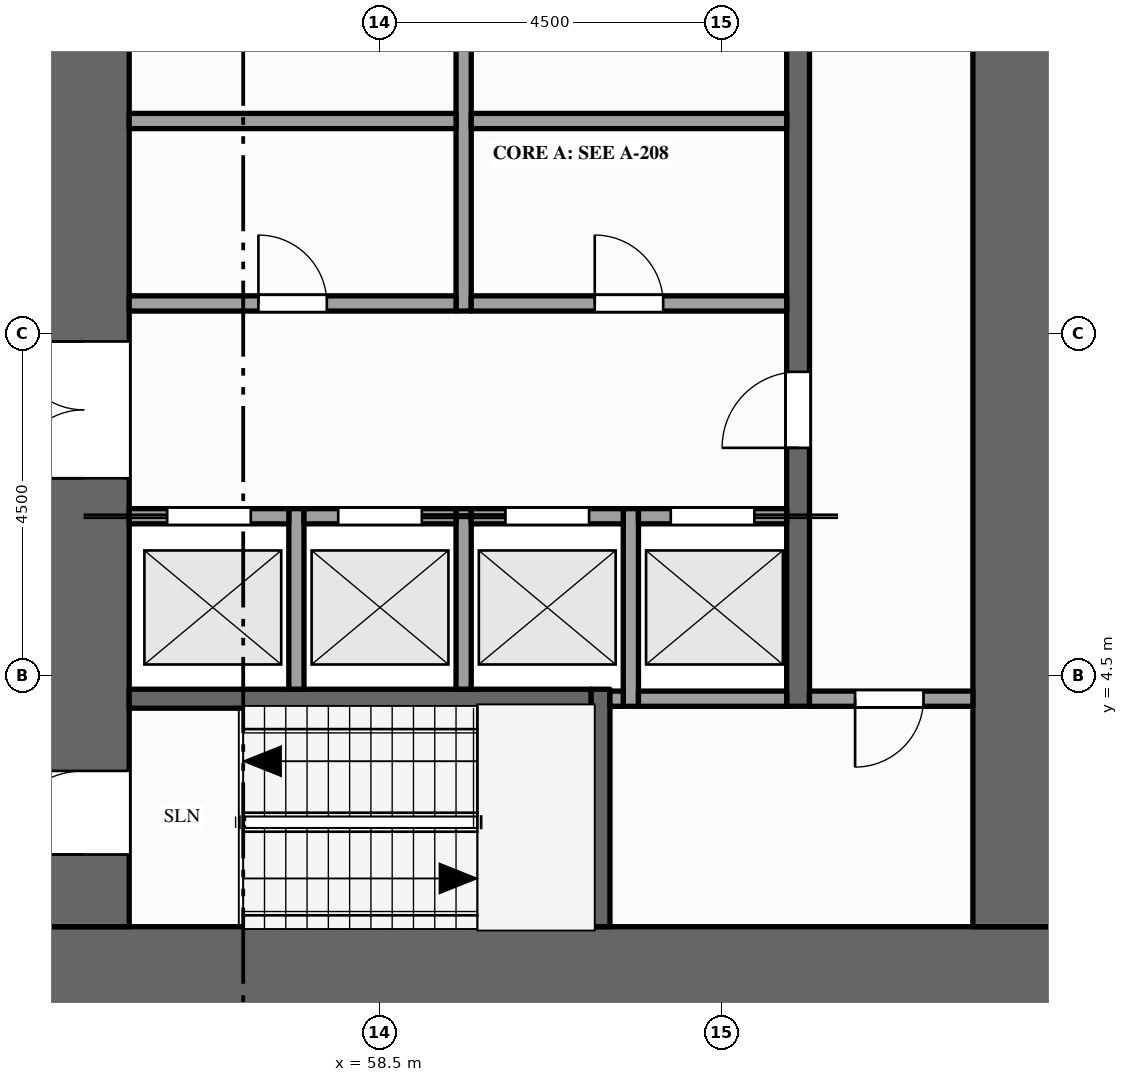
"""IFC4 building model, lengths in metres.
Left out: names, types, materials, properties, quantities, classifications, styles, units other than length and angle.
Written with IfcOpenShell. Run it as: python <this file> out.ifc"""

import sys

from ifc_helpers import new_model, si_unit, direction, frame, frame_2d, origin, place, context, subcontext, project, spatial, rectangle, extrude, element, fill, save


model = new_model("IFC4")
c1 = context("Model", 3, precision=1e-05, world=origin(), true_north=direction((0.0, 1.0)))
c2 = subcontext(c1, "Body", "Model", "MODEL_VIEW")
j1 = project(units=[si_unit("LENGTHUNIT", "METRE"), si_unit("PLANEANGLEUNIT", "RADIAN")], contexts=[c1])
p1 = place(None, origin())
s1 = spatial("IfcSite", under=j1, at=p1, CompositionType="ELEMENT")
p2 = place(p1, origin())
s2 = spatial("IfcBuilding", under=s1, at=p2, CompositionType="ELEMENT")
p3 = place(p2, frame((0.0, 0.0, 41.0)))
s3 = spatial("IfcBuildingStorey", under=s2, at=p3, CompositionType="ELEMENT", Elevation=41.0)
p4 = place(p3, frame((67.5, 0.6, -0.15), z_axis=(0.0, 0.0, 1.0), x_axis=(-1.0, 0.0, 0.0)))
e1 = element("IfcWall", 1, at=p4, inside=s3, PredefinedType="SHEAR", context=c2, shape_type="SweptSolid", body=[
    extrude(rectangle(XDim=13.5, YDim=1.2, at=frame_2d((6.75, 0.0))), origin(), (0.0, 0.0, 1.0), 4.0),
])
p5 = place(p3, frame((54.6, 1.2, -0.15), z_axis=(0.0, 0.0, 1.0), x_axis=(0.0, 1.0, 0.0)))
e2 = element("IfcWall", 2, at=p5, inside=s3, PredefinedType="SHEAR", context=c2, shape_type="SweptSolid", body=[
    extrude(rectangle(XDim=20.1, YDim=1.2, at=frame_2d((10.05, 0.0))), origin(), (0.0, 0.0, 1.0), 4.0),
])
p6 = place(p5, frame((5.9, 0.0, 0.15)))
e3 = element("IfcOpeningElement", 3, at=p6, cuts=e2, PredefinedType="OPENING", context=c2, shape_type="SweptSolid", body=[
    extrude(rectangle(XDim=1.8, YDim=2.1, at=frame_2d((0.9, 1.05))), frame((0.0, 0.61, 0.0), z_axis=(0.0, -1.0, 0.0), x_axis=(1.0, 0.0, 0.0)), (0.0, 0.0, 1.0), 1.22),
])
p7 = place(p5, frame((11.95, 0.0, 0.15)))
e4 = element("IfcOpeningElement", 4, at=p7, cuts=e2, PredefinedType="OPENING", context=c2, shape_type="SweptSolid", body=[
    extrude(rectangle(XDim=1.1, YDim=2.1, at=frame_2d((0.55, 1.05))), frame((0.0, 0.61, 0.0), z_axis=(0.0, -1.0, 0.0), x_axis=(1.0, 0.0, 0.0)), (0.0, 0.0, 1.0), 1.22),
])
p8 = place(p5, frame((0.95, 0.0, 0.15)))
e5 = element("IfcOpeningElement", 5, at=p8, cuts=e2, PredefinedType="OPENING", context=c2, shape_type="SweptSolid", body=[
    extrude(rectangle(XDim=1.1, YDim=2.1, at=frame_2d((0.55, 1.05))), frame((0.0, 0.61, 0.0), z_axis=(0.0, -1.0, 0.0), x_axis=(1.0, 0.0, 0.0)), (0.0, 0.0, 1.0), 1.22),
])
p9 = place(p5, frame((18.15, 0.0, 0.15)))
e6 = element("IfcOpeningElement", 6, at=p9, cuts=e2, PredefinedType="OPENING", context=c2, shape_type="SweptSolid", body=[
    extrude(rectangle(XDim=1.1, YDim=2.1, at=frame_2d((0.55, 1.05))), frame((0.0, 0.61, 0.0), z_axis=(0.0, -1.0, 0.0), x_axis=(1.0, 0.0, 0.0)), (0.0, 0.0, 1.0), 1.22),
])
p10 = place(p3, frame((66.9, 1.2, -0.15), z_axis=(0.0, 0.0, 1.0), x_axis=(0.0, 1.0, 0.0)))
e7 = element("IfcWall", 7, at=p10, inside=s3, PredefinedType="SHEAR", context=c2, shape_type="SweptSolid", body=[
    extrude(rectangle(XDim=20.1, YDim=1.2, at=frame_2d((10.05, 0.0))), origin(), (0.0, 0.0, 1.0), 4.0),
])
for number, where, z_axis, x_axis in (
    (8, (57.4, 4.325, 0.0), (0.0, 0.0, 1.0), (0.0, 1.0, 0.0)),
    (9, (59.6, 4.325, 0.0), (0.0, 0.0, 1.0), (0.0, 1.0, 0.0)),
):
    element("IfcWall", number, at=place(p3, frame(where, z_axis=z_axis, x_axis=x_axis)), inside=s3, PredefinedType="SOLIDWALL", context=c2, shape_type="SweptSolid", body=[
        extrude(rectangle(XDim=2.375, YDim=0.2, at=frame_2d((1.188, 0.0))), origin(), (0.0, 0.0, 1.0), 3.85),
    ])
p11 = place(p3, frame((59.6, 9.3, 0.0), z_axis=(0.0, 0.0, 1.0), x_axis=(0.0, 1.0, 0.0)))
e10 = element("IfcWall", 10, at=p11, inside=s3, PredefinedType="PARTITIONING", context=c2, shape_type="SweptSolid", body=[
    extrude(rectangle(XDim=6.2, YDim=0.2, at=frame_2d((3.1, 0.0))), origin(), (0.0, 0.0, 1.0), 3.85),
])
p12 = place(p11, frame((3.9, 0.0, 0.0)))
e11 = element("IfcOpeningElement", 11, at=p12, cuts=e10, PredefinedType="OPENING", context=c2, shape_type="SweptSolid", body=[
    extrude(rectangle(XDim=1.0, YDim=2.1, at=frame_2d((0.5, 1.05))), frame((0.0, 0.11, 0.0), z_axis=(0.0, -1.0, 0.0), x_axis=(1.0, 0.0, 0.0)), (0.0, 0.0, 1.0), 0.22),
])
p13 = place(p3, frame((61.4, 1.2, 0.0), z_axis=(0.0, 0.0, 1.0), x_axis=(0.0, 1.0, 0.0)))
e12 = element("IfcWall", 12, at=p13, inside=s3, PredefinedType="SHEAR", context=c2, shape_type="SweptSolid", body=[
    extrude(rectangle(XDim=3.125, YDim=0.25, at=frame_2d((1.562, 0.0))), origin(), (0.0, 0.0, 1.0), 3.85),
])
p14 = place(p3, frame((61.8, 4.1, 0.0), z_axis=(0.0, 0.0, 1.0), x_axis=(0.0, 1.0, 0.0)))
e13 = element("IfcWall", 13, at=p14, inside=s3, PredefinedType="SOLIDWALL", context=c2, shape_type="SweptSolid", body=[
    extrude(rectangle(XDim=2.6, YDim=0.2, at=frame_2d((1.3, 0.0))), origin(), (0.0, 0.0, 1.0), 3.85),
])
p15 = place(p3, frame((64.0, 4.1, 0.0), z_axis=(0.0, 0.0, 1.0), x_axis=(0.0, 1.0, 0.0)))
e14 = element("IfcWall", 14, at=p15, inside=s3, PredefinedType="SHEAR", context=c2, shape_type="SweptSolid", body=[
    extrude(rectangle(XDim=14.5, YDim=0.3, at=frame_2d((7.25, 0.0))), origin(), (0.0, 0.0, 1.0), 3.85),
])
p16 = place(p15, frame((3.4, 0.0, 0.0)))
e15 = element("IfcOpeningElement", 15, at=p16, cuts=e14, PredefinedType="OPENING", context=c2, shape_type="SweptSolid", body=[
    extrude(rectangle(XDim=1.0, YDim=2.1, at=frame_2d((0.5, 1.05))), frame((0.0, 0.16, 0.0), z_axis=(0.0, -1.0, 0.0), x_axis=(1.0, 0.0, 0.0)), (0.0, 0.0, 1.0), 0.32),
])
p17 = place(p15, frame((9.1, 0.0, 0.0)))
e16 = element("IfcOpeningElement", 16, at=p17, cuts=e14, PredefinedType="OPENING", context=c2, shape_type="SweptSolid", body=[
    extrude(rectangle(XDim=1.0, YDim=2.1, at=frame_2d((0.5, 1.05))), frame((0.0, 0.16, 0.0), z_axis=(0.0, -1.0, 0.0), x_axis=(1.0, 0.0, 0.0)), (0.0, 0.0, 1.0), 0.32),
])
p18 = place(p3, frame((55.2, 4.2, 0.0), z_axis=(0.0, 0.0, 1.0), x_axis=(1.0, 0.0, 0.0)))
e17 = element("IfcWall", 17, at=p18, inside=s3, PredefinedType="SHEAR", context=c2, shape_type="SweptSolid", body=[
    extrude(rectangle(XDim=6.075, YDim=0.25, at=frame_2d((3.038, 0.0))), origin(), (0.0, 0.0, 1.0), 3.85),
])
p19 = place(p3, frame((61.525, 4.2, 0.0), z_axis=(0.0, 0.0, 1.0), x_axis=(1.0, 0.0, 0.0)))
e18 = element("IfcWall", 18, at=p19, inside=s3, PredefinedType="SOLIDWALL", context=c2, shape_type="SweptSolid", body=[
    extrude(rectangle(XDim=0.175, YDim=0.2, at=frame_2d((0.087, 0.0))), origin(), (0.0, 0.0, 1.0), 3.85),
])
p20 = place(p3, frame((61.9, 4.2, 0.0), z_axis=(0.0, 0.0, 1.0), x_axis=(1.0, 0.0, 0.0)))
e19 = element("IfcWall", 19, at=p20, inside=s3, PredefinedType="SOLIDWALL", context=c2, shape_type="SweptSolid", body=[
    extrude(rectangle(XDim=1.95, YDim=0.2, at=frame_2d((0.975, 0.0))), origin(), (0.0, 0.0, 1.0), 3.85),
])
p21 = place(p3, frame((64.15, 4.2, 0.0), z_axis=(0.0, 0.0, 1.0), x_axis=(1.0, 0.0, 0.0)))
e20 = element("IfcWall", 20, at=p21, inside=s3, PredefinedType="PARTITIONING", context=c2, shape_type="SweptSolid", body=[
    extrude(rectangle(XDim=2.15, YDim=0.2, at=frame_2d((1.075, 0.0))), origin(), (0.0, 0.0, 1.0), 3.85),
])
p22 = place(p21, frame((0.6, 0.0, 0.0)))
e21 = element("IfcOpeningElement", 21, at=p22, cuts=e20, PredefinedType="OPENING", context=c2, shape_type="SweptSolid", body=[
    extrude(rectangle(XDim=0.9, YDim=2.1, at=frame_2d((0.45, 1.05))), frame((0.0, 0.11, 0.0), z_axis=(0.0, -1.0, 0.0), x_axis=(1.0, 0.0, 0.0)), (0.0, 0.0, 1.0), 0.22),
])
p23 = place(p3, frame((55.2, 6.6, 0.0), z_axis=(0.0, 0.0, 1.0), x_axis=(1.0, 0.0, 0.0)))
e22 = element("IfcWall", 22, at=p23, inside=s3, PredefinedType="SOLIDWALL", context=c2, shape_type="SweptSolid", body=[
    extrude(rectangle(XDim=2.1, YDim=0.2, at=frame_2d((1.05, 0.0))), origin(), (0.0, 0.0, 1.0), 3.85),
])
p24 = place(p23, frame((0.5, 0.0, 0.012)))
e23 = element("IfcOpeningElement", 23, at=p24, cuts=e22, PredefinedType="OPENING", context=c2, shape_type="SweptSolid", body=[
    extrude(rectangle(XDim=1.1, YDim=2.1, at=frame_2d((0.55, 1.05))), frame((0.0, 0.11, 0.0), z_axis=(0.0, -1.0, 0.0), x_axis=(1.0, 0.0, 0.0)), (0.0, 0.0, 1.0), 0.22),
])
p25 = place(p3, frame((57.5, 6.6, 0.0), z_axis=(0.0, 0.0, 1.0), x_axis=(1.0, 0.0, 0.0)))
e24 = element("IfcWall", 24, at=p25, inside=s3, PredefinedType="SOLIDWALL", context=c2, shape_type="SweptSolid", body=[
    extrude(rectangle(XDim=2.0, YDim=0.2, at=frame_2d((1.0, 0.0))), origin(), (0.0, 0.0, 1.0), 3.85),
])
p26 = place(p25, frame((0.45, 0.0, 0.012)))
e25 = element("IfcOpeningElement", 25, at=p26, cuts=e24, PredefinedType="OPENING", context=c2, shape_type="SweptSolid", body=[
    extrude(rectangle(XDim=1.1, YDim=2.1, at=frame_2d((0.55, 1.05))), frame((0.0, 0.11, 0.0), z_axis=(0.0, -1.0, 0.0), x_axis=(1.0, 0.0, 0.0)), (0.0, 0.0, 1.0), 0.22),
])
p27 = place(p3, frame((59.7, 6.6, 0.0), z_axis=(0.0, 0.0, 1.0), x_axis=(1.0, 0.0, 0.0)))
e26 = element("IfcWall", 26, at=p27, inside=s3, PredefinedType="SOLIDWALL", context=c2, shape_type="SweptSolid", body=[
    extrude(rectangle(XDim=2.0, YDim=0.2, at=frame_2d((1.0, 0.0))), origin(), (0.0, 0.0, 1.0), 3.85),
])
p28 = place(p27, frame((0.45, 0.0, 0.012)))
e27 = element("IfcOpeningElement", 27, at=p28, cuts=e26, PredefinedType="OPENING", context=c2, shape_type="SweptSolid", body=[
    extrude(rectangle(XDim=1.1, YDim=2.1, at=frame_2d((0.55, 1.05))), frame((0.0, 0.11, 0.0), z_axis=(0.0, -1.0, 0.0), x_axis=(1.0, 0.0, 0.0)), (0.0, 0.0, 1.0), 0.22),
])
p29 = place(p3, frame((61.9, 6.6, 0.0), z_axis=(0.0, 0.0, 1.0), x_axis=(1.0, 0.0, 0.0)))
e28 = element("IfcWall", 28, at=p29, inside=s3, PredefinedType="SOLIDWALL", context=c2, shape_type="SweptSolid", body=[
    extrude(rectangle(XDim=1.95, YDim=0.2, at=frame_2d((0.975, 0.0))), origin(), (0.0, 0.0, 1.0), 3.85),
])
p30 = place(p29, frame((0.425, 0.0, 0.012)))
e29 = element("IfcOpeningElement", 29, at=p30, cuts=e28, PredefinedType="OPENING", context=c2, shape_type="SweptSolid", body=[
    extrude(rectangle(XDim=1.1, YDim=2.1, at=frame_2d((0.55, 1.05))), frame((0.0, 0.11, 0.0), z_axis=(0.0, -1.0, 0.0), x_axis=(1.0, 0.0, 0.0)), (0.0, 0.0, 1.0), 0.22),
])
p31 = place(p3, frame((55.2, 9.4, 0.0), z_axis=(0.0, 0.0, 1.0), x_axis=(1.0, 0.0, 0.0)))
e30 = element("IfcWall", 30, at=p31, inside=s3, PredefinedType="PARTITIONING", context=c2, shape_type="SweptSolid", body=[
    extrude(rectangle(XDim=4.3, YDim=0.2, at=frame_2d((2.15, 0.0))), origin(), (0.0, 0.0, 1.0), 3.85),
])
p32 = place(p31, frame((1.7, 0.0, 0.0)))
e31 = element("IfcOpeningElement", 31, at=p32, cuts=e30, PredefinedType="OPENING", context=c2, shape_type="SweptSolid", body=[
    extrude(rectangle(XDim=0.9, YDim=2.1, at=frame_2d((0.45, 1.05))), frame((0.0, 0.11, 0.0), z_axis=(0.0, -1.0, 0.0), x_axis=(1.0, 0.0, 0.0)), (0.0, 0.0, 1.0), 0.22),
])
p33 = place(p3, frame((59.7, 9.4, 0.0), z_axis=(0.0, 0.0, 1.0), x_axis=(1.0, 0.0, 0.0)))
e32 = element("IfcWall", 32, at=p33, inside=s3, PredefinedType="PARTITIONING", context=c2, shape_type="SweptSolid", body=[
    extrude(rectangle(XDim=4.15, YDim=0.2, at=frame_2d((2.075, 0.0))), origin(), (0.0, 0.0, 1.0), 3.85),
])
p34 = place(p33, frame((1.625, 0.0, 0.0)))
e33 = element("IfcOpeningElement", 33, at=p34, cuts=e32, PredefinedType="OPENING", context=c2, shape_type="SweptSolid", body=[
    extrude(rectangle(XDim=0.9, YDim=2.1, at=frame_2d((0.45, 1.05))), frame((0.0, 0.11, 0.0), z_axis=(0.0, -1.0, 0.0), x_axis=(1.0, 0.0, 0.0)), (0.0, 0.0, 1.0), 0.22),
])
p35 = place(p3, frame((55.2, 11.8, 0.0), z_axis=(0.0, 0.0, 1.0), x_axis=(1.0, 0.0, 0.0)))
e34 = element("IfcWall", 34, at=p35, inside=s3, PredefinedType="PARTITIONING", context=c2, shape_type="SweptSolid", body=[
    extrude(rectangle(XDim=4.3, YDim=0.2, at=frame_2d((2.15, 0.0))), origin(), (0.0, 0.0, 1.0), 3.85),
])
p36 = place(p3, frame((59.7, 11.8, 0.0), z_axis=(0.0, 0.0, 1.0), x_axis=(1.0, 0.0, 0.0)))
e35 = element("IfcWall", 35, at=p36, inside=s3, PredefinedType="PARTITIONING", context=c2, shape_type="SweptSolid", body=[
    extrude(rectangle(XDim=4.15, YDim=0.2, at=frame_2d((2.075, 0.0))), origin(), (0.0, 0.0, 1.0), 3.85),
])
p37 = place(p24, origin())
e36 = element("IfcDoor", 36, at=p37, inside=s3, OperationType="SLIDING_TO_LEFT", PredefinedType="DOOR", context=c2, shape_type="SweptSolid", body=[
    extrude(rectangle(XDim=1.1, YDim=2.1, at=frame_2d((0.55, 1.05))), frame((0.0, 0.025, 0.0), z_axis=(0.0, -1.0, 0.0), x_axis=(1.0, 0.0, 0.0)), (0.0, 0.0, 1.0), 0.05),
])
fill(e23, e36)
p38 = place(p26, origin())
e37 = element("IfcDoor", 37, at=p38, inside=s3, OperationType="SLIDING_TO_RIGHT", PredefinedType="DOOR", context=c2, shape_type="SweptSolid", body=[
    extrude(rectangle(XDim=1.1, YDim=2.1, at=frame_2d((0.55, 1.05))), frame((0.0, 0.025, 0.0), z_axis=(0.0, -1.0, 0.0), x_axis=(1.0, 0.0, 0.0)), (0.0, 0.0, 1.0), 0.05),
])
fill(e25, e37)
p39 = place(p28, origin())
e38 = element("IfcDoor", 38, at=p39, inside=s3, OperationType="SLIDING_TO_LEFT", PredefinedType="DOOR", context=c2, shape_type="SweptSolid", body=[
    extrude(rectangle(XDim=1.1, YDim=2.1, at=frame_2d((0.55, 1.05))), frame((0.0, 0.025, 0.0), z_axis=(0.0, -1.0, 0.0), x_axis=(1.0, 0.0, 0.0)), (0.0, 0.0, 1.0), 0.05),
])
fill(e27, e38)
p40 = place(p30, origin())
e39 = element("IfcDoor", 39, at=p40, inside=s3, OperationType="SLIDING_TO_RIGHT", PredefinedType="DOOR", context=c2, shape_type="SweptSolid", body=[
    extrude(rectangle(XDim=1.1, YDim=2.1, at=frame_2d((0.55, 1.05))), frame((0.0, 0.025, 0.0), z_axis=(0.0, -1.0, 0.0), x_axis=(1.0, 0.0, 0.0)), (0.0, 0.0, 1.0), 0.05),
])
fill(e29, e39)
p41 = place(p6, origin())
e40 = element("IfcDoor", 40, at=p41, inside=s3, OperationType="DOUBLE_DOOR_SINGLE_SWING", PredefinedType="DOOR", context=c2, shape_type="SweptSolid", body=[
    extrude(rectangle(XDim=1.8, YDim=2.1, at=frame_2d((0.9, 1.05))), frame((0.0, 0.025, 0.0), z_axis=(0.0, -1.0, 0.0), x_axis=(1.0, 0.0, 0.0)), (0.0, 0.0, 1.0), 0.05),
])
fill(e3, e40)
p42 = place(p16, origin())
e41 = element("IfcDoor", 41, at=p42, inside=s3, OperationType="SINGLE_SWING_LEFT", PredefinedType="DOOR", context=c2, shape_type="SweptSolid", body=[
    extrude(rectangle(XDim=1.0, YDim=2.1, at=frame_2d((0.5, 1.05))), frame((0.0, 0.025, 0.0), z_axis=(0.0, -1.0, 0.0), x_axis=(1.0, 0.0, 0.0)), (0.0, 0.0, 1.0), 0.05),
])
fill(e15, e41)
p43 = place(p8, origin())
e42 = element("IfcDoor", 42, at=p43, inside=s3, OperationType="SINGLE_SWING_LEFT", PredefinedType="DOOR", context=c2, shape_type="SweptSolid", body=[
    extrude(rectangle(XDim=1.1, YDim=2.1, at=frame_2d((0.55, 1.05))), frame((0.0, 0.025, 0.0), z_axis=(0.0, -1.0, 0.0), x_axis=(1.0, 0.0, 0.0)), (0.0, 0.0, 1.0), 0.05),
])
fill(e5, e42)
p44 = place(p22, origin())
e43 = element("IfcDoor", 43, at=p44, inside=s3, OperationType="SINGLE_SWING_LEFT", PredefinedType="DOOR", context=c2, shape_type="SweptSolid", body=[
    extrude(rectangle(XDim=0.9, YDim=2.1, at=frame_2d((0.45, 1.05))), frame((0.0, 0.025, 0.0), z_axis=(0.0, -1.0, 0.0), x_axis=(1.0, 0.0, 0.0)), (0.0, 0.0, 1.0), 0.05),
])
fill(e21, e43)
p45 = place(p32, origin())
e44 = element("IfcDoor", 44, at=p45, inside=s3, OperationType="SINGLE_SWING_LEFT", PredefinedType="DOOR", context=c2, shape_type="SweptSolid", body=[
    extrude(rectangle(XDim=0.9, YDim=2.1, at=frame_2d((0.45, 1.05))), frame((0.0, 0.025, 0.0), z_axis=(0.0, -1.0, 0.0), x_axis=(1.0, 0.0, 0.0)), (0.0, 0.0, 1.0), 0.05),
])
fill(e31, e44)
p46 = place(p34, origin())
e45 = element("IfcDoor", 45, at=p46, inside=s3, OperationType="SINGLE_SWING_LEFT", PredefinedType="DOOR", context=c2, shape_type="SweptSolid", body=[
    extrude(rectangle(XDim=0.9, YDim=2.1, at=frame_2d((0.45, 1.05))), frame((0.0, 0.025, 0.0), z_axis=(0.0, -1.0, 0.0), x_axis=(1.0, 0.0, 0.0)), (0.0, 0.0, 1.0), 0.05),
])
fill(e33, e45)
save(model, sys.argv[1])
